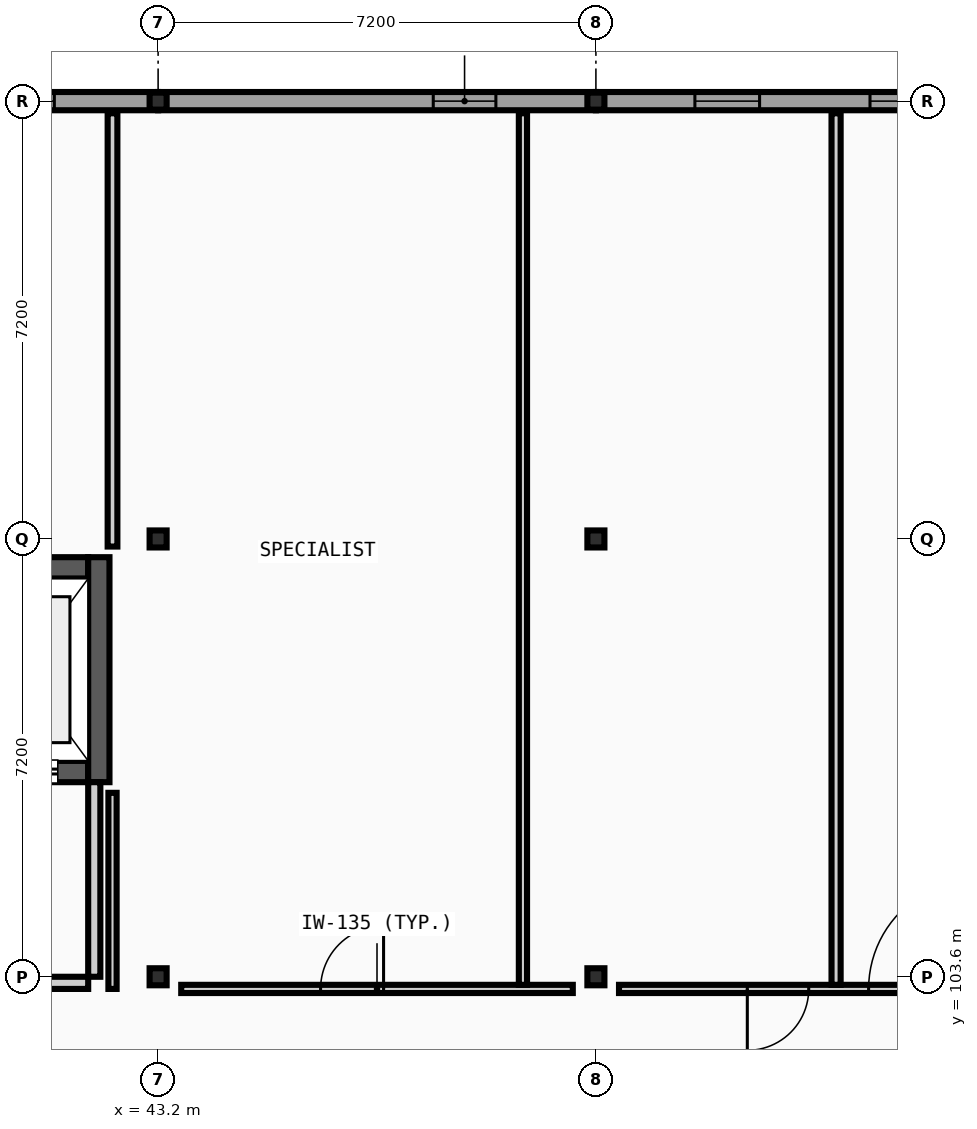
"""IFC4 building model, lengths in metres.
Left out: names, types, materials, properties, quantities, classifications, styles, units other than length and angle.
Written with IfcOpenShell. Run it as: python <this file> out.ifc"""

import sys

from ifc_helpers import new_model, si_unit, direction, frame, frame_2d, origin, origin_2d, place, context, subcontext, project, spatial, rectangle, i_section, extrude, element, fill, save


model = new_model("IFC4")
c1 = context("Model", 3, precision=1e-05, world=origin(), true_north=direction((0.0, 1.0)))
c2 = subcontext(c1, "Body", "Model", "MODEL_VIEW")
j1 = project(units=[si_unit("LENGTHUNIT", "METRE"), si_unit("PLANEANGLEUNIT", "RADIAN")], contexts=[c1])
p1 = place(None, origin())
s1 = spatial("IfcSite", under=j1, at=p1, CompositionType="ELEMENT")
p2 = place(p1, origin())
s2 = spatial("IfcBuilding", under=s1, at=p2, CompositionType="ELEMENT")
p3 = place(p2, frame((0.0, 0.0, 22.8)))
s3 = spatial("IfcBuildingStorey", under=s2, at=p3, CompositionType="ELEMENT", Elevation=22.8)
for number, where, z_axis, x_axis in (
    (1, (43.2, 103.6, 0.0), (0.0, 0.0, 1.0), (1.0, 0.0, 0.0)),
    (2, (43.2, 110.8, 0.0), (0.0, 0.0, 1.0), (1.0, 0.0, 0.0)),
    (3, (43.2, 118.0, 0.0), (0.0, 0.0, 1.0), (1.0, 0.0, 0.0)),
    (4, (50.4, 103.6, 0.0), (0.0, 0.0, 1.0), (1.0, 0.0, 0.0)),
    (5, (50.4, 110.8, 0.0), (0.0, 0.0, 1.0), (1.0, 0.0, 0.0)),
    (6, (50.4, 118.0, 0.0), (0.0, 0.0, 1.0), (1.0, 0.0, 0.0)),
):
    element("IfcColumn", number, at=place(p3, frame(where, z_axis=z_axis, x_axis=x_axis)), inside=s3, PredefinedType="COLUMN", context=c2, shape_type="SweptSolid", body=[
        extrude(i_section(OverallWidth=0.28, OverallDepth=0.28, WebThickness=0.01, FlangeThickness=0.018, FilletRadius=0.024, at=origin_2d()), origin(), (0.0, 0.0, 1.0), 4.4),
    ])
p4 = place(p3, frame((43.2, 118.0, 0.0), z_axis=(0.0, 0.0, 1.0), x_axis=(-1.0, 0.0, 0.0)))
e7 = element("IfcWall", 7, at=p4, inside=s3, PredefinedType="STANDARD", context=c2, shape_type="SweptSolid", body=[
    extrude(rectangle(XDim=7.35, YDim=0.3, at=frame_2d((3.675, 0.0))), origin(), (0.0, 0.0, 1.0), 4.035),
])
p5 = place(p4, frame((1.707, 0.0, 0.95)))
e8 = element("IfcOpeningElement", 8, at=p5, cuts=e7, PredefinedType="OPENING", context=c2, shape_type="SweptSolid", body=[
    extrude(rectangle(XDim=0.996, YDim=1.296, at=frame_2d((0.498, 0.648))), frame((0.0, 0.16, 0.0), z_axis=(0.0, -1.0, 0.0), x_axis=(1.0, 0.0, 0.0)), (0.0, 0.0, 1.0), 0.32),
])
p6 = place(p4, frame((4.647, 0.0, 0.95)))
e9 = element("IfcOpeningElement", 9, at=p6, cuts=e7, PredefinedType="OPENING", context=c2, shape_type="SweptSolid", body=[
    extrude(rectangle(XDim=0.996, YDim=1.296, at=frame_2d((0.498, 0.648))), frame((0.0, 0.16, 0.0), z_axis=(0.0, -1.0, 0.0), x_axis=(1.0, 0.0, 0.0)), (0.0, 0.0, 1.0), 0.32),
])
p7 = place(p3, frame((50.4, 118.0, 0.0), z_axis=(0.0, 0.0, 1.0), x_axis=(-1.0, 0.0, 0.0)))
e10 = element("IfcWall", 10, at=p7, inside=s3, PredefinedType="STANDARD", context=c2, shape_type="SweptSolid", body=[
    extrude(rectangle(XDim=7.2, YDim=0.3, at=frame_2d((3.6, 0.0))), origin(), (0.0, 0.0, 1.0), 4.035),
])
p8 = place(p7, frame((1.645, 0.0, 0.95)))
e11 = element("IfcOpeningElement", 11, at=p8, cuts=e10, PredefinedType="OPENING", context=c2, shape_type="SweptSolid", body=[
    extrude(rectangle(XDim=1.03, YDim=1.296, at=frame_2d((0.515, 0.648))), frame((0.0, 0.16, 0.0), z_axis=(0.0, -1.0, 0.0), x_axis=(1.0, 0.0, 0.0)), (0.0, 0.0, 1.0), 0.32),
])
p9 = place(p3, frame((57.6, 118.0, 0.0), z_axis=(0.0, 0.0, 1.0), x_axis=(-1.0, 0.0, 0.0)))
e12 = element("IfcWall", 12, at=p9, inside=s3, PredefinedType="STANDARD", context=c2, shape_type="SweptSolid", body=[
    extrude(rectangle(XDim=7.2, YDim=0.3, at=frame_2d((3.6, 0.0))), origin(), (0.0, 0.0, 1.0), 4.035),
])
p10 = place(p9, frame((1.628, 0.0, 0.95)))
e13 = element("IfcOpeningElement", 13, at=p10, cuts=e12, PredefinedType="OPENING", context=c2, shape_type="SweptSolid", body=[
    extrude(rectangle(XDim=1.064, YDim=1.296, at=frame_2d((0.532, 0.648))), frame((0.0, 0.16, 0.0), z_axis=(0.0, -1.0, 0.0), x_axis=(1.0, 0.0, 0.0)), (0.0, 0.0, 1.0), 0.32),
])
p11 = place(p9, frame((4.508, 0.0, 0.95)))
e14 = element("IfcOpeningElement", 14, at=p11, cuts=e12, PredefinedType="OPENING", context=c2, shape_type="SweptSolid", body=[
    extrude(rectangle(XDim=1.064, YDim=1.296, at=frame_2d((0.532, 0.648))), frame((0.0, 0.16, 0.0), z_axis=(0.0, -1.0, 0.0), x_axis=(1.0, 0.0, 0.0)), (0.0, 0.0, 1.0), 0.32),
])
p12 = place(p3, frame((39.85, 106.975, 0.0), z_axis=(0.0, 0.0, 1.0), x_axis=(1.0, 0.0, 0.0)))
e15 = element("IfcWall", 15, at=p12, inside=s3, PredefinedType="SHEAR", context=c2, shape_type="SweptSolid", body=[
    extrude(rectangle(XDim=2.2, YDim=0.35, at=frame_2d((1.1, 0.0))), origin(), (0.0, 0.0, 1.0), 4.18),
])
p13 = place(p12, frame((0.5, 0.0, 0.0)))
e16 = element("IfcOpeningElement", 16, at=p13, cuts=e15, PredefinedType="OPENING", context=c2, shape_type="SweptSolid", body=[
    extrude(rectangle(XDim=1.2, YDim=2.2, at=frame_2d((0.6, 1.1))), frame((0.0, 0.185, 0.0), z_axis=(0.0, -1.0, 0.0), x_axis=(1.0, 0.0, 0.0)), (0.0, 0.0, 1.0), 0.37),
])
p14 = place(p3, frame((39.85, 110.325, 0.0), z_axis=(0.0, 0.0, 1.0), x_axis=(1.0, 0.0, 0.0)))
e17 = element("IfcWall", 17, at=p14, inside=s3, PredefinedType="SHEAR", context=c2, shape_type="SweptSolid", body=[
    extrude(rectangle(XDim=2.2, YDim=0.35, at=frame_2d((1.1, 0.0))), origin(), (0.0, 0.0, 1.0), 4.18),
])
p15 = place(p3, frame((42.225, 106.8, 0.0), z_axis=(0.0, 0.0, 1.0), x_axis=(0.0, 1.0, 0.0)))
e18 = element("IfcWall", 18, at=p15, inside=s3, PredefinedType="SHEAR", context=c2, shape_type="SweptSolid", body=[
    extrude(rectangle(XDim=3.7, YDim=0.35, at=frame_2d((1.85, 0.0))), origin(), (0.0, 0.0, 1.0), 4.18),
])
p16 = place(p3, frame((36.35, 103.5, 0.0), z_axis=(0.0, 0.0, 1.0), x_axis=(1.0, 0.0, 0.0)))
e19 = element("IfcWall", 19, at=p16, inside=s3, PredefinedType="PARTITIONING", context=c2, shape_type="SweptSolid", body=[
    extrude(rectangle(XDim=5.7, YDim=0.2, at=frame_2d((2.85, 0.0))), origin(), (0.0, 0.0, 1.0), 4.035),
])
p17 = place(p16, frame((2.05, 0.0, 0.0)))
e20 = element("IfcOpeningElement", 20, at=p17, cuts=e19, PredefinedType="OPENING", context=c2, shape_type="SweptSolid", body=[
    extrude(rectangle(XDim=1.6, YDim=2.2, at=frame_2d((0.8, 1.1))), frame((0.0, 0.11, 0.0), z_axis=(0.0, -1.0, 0.0), x_axis=(1.0, 0.0, 0.0)), (0.0, 0.0, 1.0), 0.22),
])
p18 = place(p3, frame((42.15, 103.6, 0.0), z_axis=(0.0, 0.0, 1.0), x_axis=(0.0, 1.0, 0.0)))
e21 = element("IfcWall", 21, at=p18, inside=s3, PredefinedType="PARTITIONING", context=c2, shape_type="SweptSolid", body=[
    extrude(rectangle(XDim=3.2, YDim=0.2, at=frame_2d((1.6, 0.0))), origin(), (0.0, 0.0, 1.0), 4.18),
])
p19 = place(p3, frame((43.58, 103.4, 0.0), z_axis=(0.0, 0.0, 1.0), x_axis=(1.0, 0.0, 0.0)))
e22 = element("IfcWall", 22, at=p19, inside=s3, PredefinedType="PARTITIONING", context=c2, shape_type="SweptSolid", body=[
    extrude(rectangle(XDim=6.44, YDim=0.135, at=frame_2d((3.22, 0.0))), origin(), (0.0, 0.0, 1.0), 4.035),
])
p20 = place(p19, frame((2.292, 0.0, 0.0)))
e23 = element("IfcOpeningElement", 23, at=p20, cuts=e22, PredefinedType="OPENING", context=c2, shape_type="SweptSolid", body=[
    extrude(rectangle(XDim=1.036, YDim=2.096, at=frame_2d((0.518, 1.048))), frame((0.0, 0.078, 0.0), z_axis=(0.0, -1.0, 0.0), x_axis=(1.0, 0.0, 0.0)), (0.0, 0.0, 1.0), 0.155),
])
p21 = place(p3, frame((50.78, 103.4, 0.0), z_axis=(0.0, 0.0, 1.0), x_axis=(1.0, 0.0, 0.0)))
e24 = element("IfcWall", 24, at=p21, inside=s3, PredefinedType="PARTITIONING", context=c2, shape_type="SweptSolid", body=[
    extrude(rectangle(XDim=6.44, YDim=0.135, at=frame_2d((3.22, 0.0))), origin(), (0.0, 0.0, 1.0), 4.035),
])
p22 = place(p21, frame((4.105, 0.0, 0.0)))
e25 = element("IfcOpeningElement", 25, at=p22, cuts=e24, PredefinedType="OPENING", context=c2, shape_type="SweptSolid", body=[
    extrude(rectangle(XDim=1.8, YDim=2.3, at=frame_2d((0.9, 1.15))), frame((0.0, 0.078, 0.0), z_axis=(0.0, -1.0, 0.0), x_axis=(1.0, 0.0, 0.0)), (0.0, 0.0, 1.0), 0.155),
])
p23 = place(p21, frame((2.11, 0.0, 0.0)))
e26 = element("IfcOpeningElement", 26, at=p23, cuts=e24, PredefinedType="OPENING", context=c2, shape_type="SweptSolid", body=[
    extrude(rectangle(XDim=1.01, YDim=2.096, at=frame_2d((0.505, 1.048))), frame((0.0, 0.078, 0.0), z_axis=(0.0, -1.0, 0.0), x_axis=(1.0, 0.0, 0.0)), (0.0, 0.0, 1.0), 0.155),
])
p24 = place(p3, frame((42.45, 103.4, 0.0), z_axis=(0.0, 0.0, 1.0), x_axis=(0.0, 1.0, 0.0)))
e27 = element("IfcWall", 27, at=p24, inside=s3, PredefinedType="PARTITIONING", context=c2, shape_type="SweptSolid", body=[
    extrude(rectangle(XDim=3.225, YDim=0.135, at=frame_2d((1.613, 0.0))), origin(), (0.0, 0.0, 1.0), 4.18),
])
p25 = place(p3, frame((42.45, 110.675, 0.0), z_axis=(0.0, 0.0, 1.0), x_axis=(0.0, 1.0, 0.0)))
e28 = element("IfcWall", 28, at=p25, inside=s3, PredefinedType="PARTITIONING", context=c2, shape_type="SweptSolid", body=[
    extrude(rectangle(XDim=7.125, YDim=0.16, at=frame_2d((3.562, 0.0))), origin(), (0.0, 0.0, 1.0), 4.18),
])
p26 = place(p3, frame((49.2, 103.468, 0.0), z_axis=(0.0, 0.0, 1.0), x_axis=(0.0, 1.0, 0.0)))
e29 = element("IfcWall", 29, at=p26, inside=s3, PredefinedType="PARTITIONING", context=c2, shape_type="SweptSolid", body=[
    extrude(rectangle(XDim=14.333, YDim=0.135, at=frame_2d((7.166, 0.0))), origin(), (0.0, 0.0, 1.0), 4.18),
])
p27 = place(p3, frame((54.35, 103.468, 0.0), z_axis=(0.0, 0.0, 1.0), x_axis=(0.0, 1.0, 0.0)))
e30 = element("IfcWall", 30, at=p27, inside=s3, PredefinedType="PARTITIONING", context=c2, shape_type="SweptSolid", body=[
    extrude(rectangle(XDim=14.333, YDim=0.15, at=frame_2d((7.166, 0.0))), origin(), (0.0, 0.0, 1.0), 4.18),
])
p28 = place(p5, origin())
e31 = element("IfcWindow", 31, at=p28, inside=s3, PartitioningType="SINGLE_PANEL", PredefinedType="WINDOW", context=c2, shape_type="SweptSolid", body=[
    extrude(rectangle(XDim=0.996, YDim=1.296, at=frame_2d((0.498, 0.648))), frame((0.0, 0.03, 0.0), z_axis=(0.0, -1.0, 0.0), x_axis=(1.0, 0.0, 0.0)), (0.0, 0.0, 1.0), 0.06),
])
fill(e8, e31)
p29 = place(p8, origin())
e32 = element("IfcWindow", 32, at=p29, inside=s3, PartitioningType="SINGLE_PANEL", PredefinedType="WINDOW", context=c2, shape_type="SweptSolid", body=[
    extrude(rectangle(XDim=1.03, YDim=1.296, at=frame_2d((0.515, 0.648))), frame((0.0, 0.03, 0.0), z_axis=(0.0, -1.0, 0.0), x_axis=(1.0, 0.0, 0.0)), (0.0, 0.0, 1.0), 0.06),
])
fill(e11, e32)
p30 = place(p10, origin())
e33 = element("IfcWindow", 33, at=p30, inside=s3, PartitioningType="SINGLE_PANEL", PredefinedType="WINDOW", context=c2, shape_type="SweptSolid", body=[
    extrude(rectangle(XDim=1.064, YDim=1.296, at=frame_2d((0.532, 0.648))), frame((0.0, 0.03, 0.0), z_axis=(0.0, -1.0, 0.0), x_axis=(1.0, 0.0, 0.0)), (0.0, 0.0, 1.0), 0.06),
])
fill(e13, e33)
p31 = place(p11, origin())
e34 = element("IfcWindow", 34, at=p31, inside=s3, PartitioningType="SINGLE_PANEL", PredefinedType="WINDOW", context=c2, shape_type="SweptSolid", body=[
    extrude(rectangle(XDim=1.064, YDim=1.296, at=frame_2d((0.532, 0.648))), frame((0.0, 0.03, 0.0), z_axis=(0.0, -1.0, 0.0), x_axis=(1.0, 0.0, 0.0)), (0.0, 0.0, 1.0), 0.06),
])
fill(e14, e34)
p32 = place(p13, origin())
e35 = element("IfcDoor", 35, at=p32, inside=s3, OperationType="SLIDING_TO_RIGHT", PredefinedType="DOOR", context=c2, shape_type="SweptSolid", body=[
    extrude(rectangle(XDim=1.2, YDim=2.2, at=frame_2d((0.6, 1.1))), frame((0.0, 0.025, 0.0), z_axis=(0.0, -1.0, 0.0), x_axis=(1.0, 0.0, 0.0)), (0.0, 0.0, 1.0), 0.05),
])
fill(e16, e35)
p33 = place(p22, frame((1.8, 0.0, 0.0), z_axis=(0.0, 0.0, 1.0), x_axis=(-1.0, 0.0, 0.0)))
e36 = element("IfcDoor", 36, at=p33, inside=s3, OperationType="DOUBLE_DOOR_SINGLE_SWING", PredefinedType="DOOR", context=c2, shape_type="SweptSolid", body=[
    extrude(rectangle(XDim=1.8, YDim=2.3, at=frame_2d((0.9, 1.15))), frame((0.0, 0.025, 0.0), z_axis=(0.0, -1.0, 0.0), x_axis=(1.0, 0.0, 0.0)), (0.0, 0.0, 1.0), 0.05),
])
fill(e25, e36)
p34 = place(p23, frame((1.01, 0.0, 0.0), z_axis=(0.0, 0.0, 1.0), x_axis=(-1.0, 0.0, 0.0)))
e37 = element("IfcDoor", 37, at=p34, inside=s3, OperationType="SINGLE_SWING_LEFT", PredefinedType="DOOR", context=c2, shape_type="SweptSolid", body=[
    extrude(rectangle(XDim=1.01, YDim=2.096, at=frame_2d((0.505, 1.048))), frame((0.0, 0.025, 0.0), z_axis=(0.0, -1.0, 0.0), x_axis=(1.0, 0.0, 0.0)), (0.0, 0.0, 1.0), 0.05),
])
fill(e26, e37)
p35 = place(p20, frame((1.036, 0.0, 0.0), z_axis=(0.0, 0.0, 1.0), x_axis=(-1.0, 0.0, 0.0)))
e38 = element("IfcDoor", 38, at=p35, inside=s3, OperationType="SINGLE_SWING_RIGHT", PredefinedType="DOOR", context=c2, shape_type="SweptSolid", body=[
    extrude(rectangle(XDim=1.036, YDim=2.096, at=frame_2d((0.518, 1.048))), frame((0.0, 0.025, 0.0), z_axis=(0.0, -1.0, 0.0), x_axis=(1.0, 0.0, 0.0)), (0.0, 0.0, 1.0), 0.05),
])
fill(e23, e38)
save(model, sys.argv[1])
